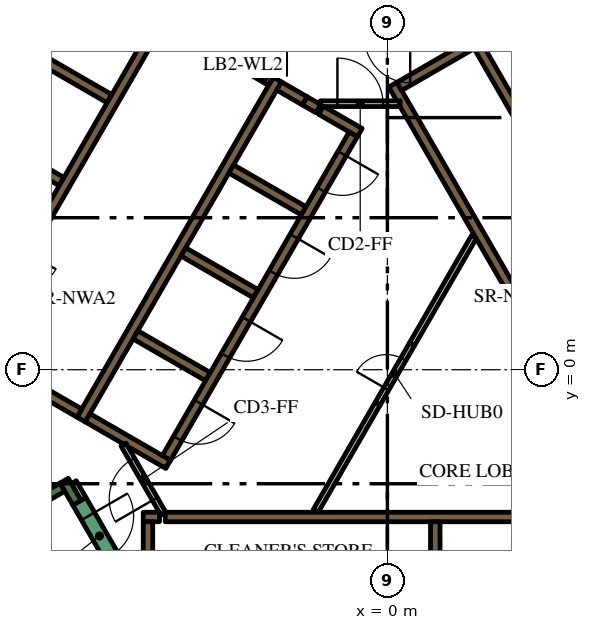
"""IFC4 building model, lengths in metres.
Left out: names, types, materials, properties, quantities, classifications, styles, units other than length and angle.
Written with IfcOpenShell. Run it as: python <this file> out.ifc"""

import sys

from ifc_helpers import new_model, si_unit, direction, frame, frame_2d, origin, place, context, subcontext, project, spatial, polyline, rectangle, outline, extrude, element, fill, save


model = new_model("IFC4")
c1 = context("Model", 3, precision=1e-05, world=origin(), true_north=direction((0.0, 1.0)))
c2 = subcontext(c1, "Body", "Model", "MODEL_VIEW")
j1 = project(units=[si_unit("LENGTHUNIT", "METRE"), si_unit("PLANEANGLEUNIT", "RADIAN")], contexts=[c1])
p1 = place(None, origin())
s1 = spatial("IfcSite", under=j1, at=p1, CompositionType="ELEMENT")
p2 = place(p1, origin())
s2 = spatial("IfcBuilding", under=s1, at=p2, CompositionType="ELEMENT")
p3 = place(p2, frame((0.0, 0.0, 87.6)))
s3 = spatial("IfcBuildingStorey", under=s2, at=p3, CompositionType="ELEMENT", Elevation=87.6)
p4 = place(p3, frame((-15.36, -1.503, 0.0), z_axis=(0.0, 0.0, 1.0), x_axis=(0.50000389221, 0.866023156604, 0.0)))
e1 = element("IfcWall", 1, at=p4, inside=s3, PredefinedType="SOLIDWALL", context=c2, shape_type="SweptSolid", body=[
    extrude(rectangle(XDim=21.0, YDim=0.9, at=frame_2d((10.5, 0.0))), origin(), (0.0, 0.0, 1.0), 3.9),
])
p5 = place(p3, frame((-14.44, -6.49, 0.0), z_axis=(0.0, 0.0, 1.0), x_axis=(0.866022966069, 0.500004222222, 0.0)))
e2 = element("IfcWall", 2, at=p5, inside=s3, PredefinedType="SOLIDWALL", context=c2, shape_type="SweptSolid", body=[
    extrude(rectangle(XDim=6.8, YDim=0.25, at=frame_2d((3.4, 0.0))), origin(), (0.0, 0.0, 1.0), 3.9),
])
p6 = place(p3, frame((-8.168, -3.503, 0.0), z_axis=(0.0, 0.0, 1.0), x_axis=(-0.499952099219, 0.866053057547, 0.0)))
e3 = element("IfcWall", 3, at=p6, inside=s3, PredefinedType="SOLIDWALL", context=c2, shape_type="SweptSolid", body=[
    extrude(rectangle(XDim=0.675, YDim=0.25, at=frame_2d((0.337, 0.0))), origin(), (0.0, 0.0, 1.0), 3.9),
])
p7 = place(p3, frame((-5.845, -3.875, 0.0), z_axis=(0.0, 0.0, 1.0), x_axis=(1.0, 0.0, 0.0)))
e4 = element("IfcWall", 4, at=p7, inside=s3, PredefinedType="SOLIDWALL", context=c2, shape_type="SweptSolid", body=[
    extrude(rectangle(XDim=12.27, YDim=0.25, at=frame_2d((6.135, 0.0))), origin(), (0.0, 0.0, 1.0), 3.9),
])
p8 = place(p3, frame((-6.425, -3.875, 0.0), z_axis=(0.0, 0.0, 1.0), x_axis=(1.0, 0.0, 0.0)))
e5 = element("IfcWall", 5, at=p8, inside=s3, PredefinedType="SOLIDWALL", context=c2, shape_type="SweptSolid", body=[
    extrude(rectangle(XDim=0.428, YDim=0.25, at=frame_2d((0.214, 0.0))), origin(), (0.0, 0.0, 1.0), 3.9),
])
p9 = place(p3, frame((1.26, -4.0, 0.0), z_axis=(0.0, 0.0, 1.0), x_axis=(0.0, -1.0, 0.0)))
e6 = element("IfcWall", 6, at=p9, inside=s3, PredefinedType="SOLIDWALL", context=c2, shape_type="SweptSolid", body=[
    extrude(rectangle(XDim=2.2, YDim=0.25, at=frame_2d((1.1, 0.0))), origin(), (0.0, 0.0, 1.0), 3.9),
])
p10 = place(p3, frame((-6.3, -4.0, 0.0), z_axis=(0.0, 0.0, 1.0), x_axis=(0.0, -1.0, 0.0)))
e7 = element("IfcWall", 7, at=p10, inside=s3, PredefinedType="SOLIDWALL", context=c2, shape_type="SweptSolid", body=[
    extrude(rectangle(XDim=3.154, YDim=0.25, at=frame_2d((1.577, 0.0))), origin(), (0.0, 0.0, 1.0), 3.9),
])
p11 = place(p3, origin())
e8 = element("IfcWall", 8, at=p11, inside=s3, PredefinedType="SOLIDWALL", context=c2, shape_type="SweptSolid", body=[
    extrude(outline(polyline([(0.335, 6.925), (0.335, 7.075), (0.335, 7.075), (0.335, 7.075), (0.245, 7.075), (0.079, 7.363), (0.035, 7.439), (0.252, 7.564), (0.377, 7.348), (6.552, -3.348), (6.677, -3.564), (6.46, -3.689), (4.897, -0.981), (0.332, 6.925), (0.335, 6.925), (0.335, 6.925), (0.335, 6.925)])), origin(), (0.0, 0.0, 1.0), 3.9),
])
p12 = place(p3, frame((0.314, 7.456, 0.0), z_axis=(0.0, 0.0, 1.0), x_axis=(0.866013897511, 0.50001992892, 0.0)))
e9 = element("IfcWall", 9, at=p12, inside=s3, PredefinedType="SOLIDWALL", context=c2, shape_type="SweptSolid", body=[
    extrude(rectangle(XDim=3.268, YDim=0.25, at=frame_2d((1.634, 0.0))), origin(), (0.0, 0.0, 1.0), 3.9),
])
p13 = place(p3, frame((-8.06, -1.311, 0.0), z_axis=(0.0, 0.0, 1.0), x_axis=(0.50000273126, 0.866023826885, 0.0)))
e10 = element("IfcWall", 10, at=p13, inside=s3, PredefinedType="SOLIDWALL", context=c2, shape_type="SweptSolid", body=[
    extrude(rectangle(XDim=10.33, YDim=0.25, at=frame_2d((5.165, 0.0))), origin(), (0.0, 0.0, 1.0), 3.9),
])
p14 = place(p3, frame((-1.819, 6.87, 0.0), z_axis=(0.0, 0.0, 1.0), x_axis=(-0.866294599386, 0.499533449405, 0.0)))
e11 = element("IfcWall", 11, at=p14, inside=s3, PredefinedType="SOLIDWALL", context=c2, shape_type="SweptSolid", body=[
    extrude(rectangle(XDim=0.41, YDim=0.25, at=frame_2d((0.205, 0.0))), origin(), (0.0, 0.0, 1.0), 3.9),
])
p15 = place(p3, frame((-2.849, 7.465, 0.0), z_axis=(0.0, 0.0, 1.0), x_axis=(0.865955664968, -0.500120771724, 0.0)))
e12 = element("IfcWall", 12, at=p15, inside=s3, PredefinedType="SOLIDWALL", context=c2, shape_type="SweptSolid", body=[
    extrude(rectangle(XDim=0.778, YDim=0.25, at=frame_2d((0.389, 0.0))), origin(), (0.0, 0.0, 1.0), 3.9),
])
p16 = place(p3, frame((-0.728, 6.24, 0.0), z_axis=(0.0, 0.0, 1.0), x_axis=(-0.866002680491, 0.500039355833, 0.0)))
e13 = element("IfcWall", 13, at=p16, inside=s3, PredefinedType="SOLIDWALL", context=c2, shape_type="SweptSolid", body=[
    extrude(rectangle(XDim=1.178, YDim=0.25, at=frame_2d((0.589, 0.0))), origin(), (0.0, 0.0, 1.0), 3.9),
])
for number, where, z_axis, x_axis in (
    (14, (-2.204, 4.182, 0.0), (0.0, 0.0, 1.0), (-0.866, 0.5, 0.0)),
    (15, (-5.369, 3.1, 0.0), (0.0, 0.0, 1.0), (0.866, -0.5, 0.0)),
    (16, (-4.724, -0.182, 0.0), (0.0, 0.0, 1.0), (-0.866, 0.5, 0.0)),
):
    element("IfcWall", number, at=place(p3, frame(where, z_axis=z_axis, x_axis=x_axis)), inside=s3, PredefinedType="SOLIDWALL", context=c2, shape_type="SweptSolid", body=[
        extrude(rectangle(XDim=2.2, YDim=0.25, at=frame_2d((1.1, 0.0))), origin(), (0.0, 0.0, 1.0), 3.9),
    ])
e17 = element("IfcWall", 17, at=p11, inside=s3, PredefinedType="SOLIDWALL", context=c2, shape_type="SweptSolid", body=[
    extrude(outline(polyline([(-5.922, -2.257), (-5.922, -2.257), (-5.705, -2.382), (-5.83, -2.598), (-6.829, -2.021), (-6.88, -1.934), (-6.88, -1.934), (-6.93, -1.963), (-7.952, -1.373), (-7.827, -1.156), (-5.922, -2.257)])), origin(), (0.0, 0.0, 1.0), 3.9),
])
p17 = place(p3, frame((-8.106, -1.14, 0.0), z_axis=(0.0, 0.0, 1.0), x_axis=(-0.866000643155, 0.500042884217, 0.0)))
e18 = element("IfcWall", 18, at=p17, inside=s3, PredefinedType="SOLIDWALL", context=c2, shape_type="SweptSolid", body=[
    extrude(rectangle(XDim=5.65, YDim=0.25, at=frame_2d((2.825, 0.0))), origin(), (0.0, 0.0, 1.0), 3.9),
])
e19 = element("IfcWall", 19, at=p11, inside=s3, PredefinedType="SOLIDWALL", context=c2, shape_type="SweptSolid", body=[
    extrude(outline(polyline([(-3.128, 7.481), (-3.259, 7.557), (-3.134, 7.773), (-3.003, 7.698), (-3.128, 7.481)])), origin(), (0.0, 0.0, 1.0), 3.9),
])
for number, where, z_axis, x_axis in (
    (20, (-8.574, 4.95, 0.0), (0.0, 0.0, 1.0), (-0.866, 0.5, 0.0)),
    (21, (-7.314, 7.132, 0.0), (0.0, 0.0, 1.0), (-0.866, 0.5, 0.0)),
):
    element("IfcWall", number, at=place(p3, frame(where, z_axis=z_axis, x_axis=x_axis)), inside=s3, PredefinedType="SOLIDWALL", context=c2, shape_type="SweptSolid", body=[
        extrude(rectangle(XDim=2.2, YDim=0.25, at=frame_2d((1.1, 0.0))), origin(), (0.0, 0.0, 1.0), 3.9),
    ])
p18 = place(p3, frame((-7.959, 10.415, 0.0), z_axis=(0.0, 0.0, 1.0), x_axis=(0.866020958405, -0.500007699544, 0.0)))
e22 = element("IfcWall", 22, at=p18, inside=s3, PredefinedType="SOLIDWALL", context=c2, shape_type="SweptSolid", body=[
    extrude(rectangle(XDim=4.1, YDim=0.25, at=frame_2d((2.05, 0.0))), origin(), (0.0, 0.0, 1.0), 3.9),
])
p19 = place(p3, frame((-8.252, -2.958, 0.0), z_axis=(0.0, 0.0, 1.0), x_axis=(0.500174715838, -0.865924508047, 0.0)))
e23 = element("IfcWall", 23, at=p19, inside=s3, PredefinedType="PARTITIONING", context=c2, shape_type="SweptSolid", body=[
    extrude(rectangle(XDim=0.514, YDim=0.15, at=frame_2d((0.257, 0.0))), origin(), (0.0, 0.0, 1.0), 2.75),
])
for number, where, z_axis, x_axis in (
    (24, (-1.887, -3.718, 0.0), (0.0, 0.0, 1.0), (0.5, 0.866, 0.0)),
    (25, (0.645, 0.667, 0.0), (0.0, 0.0, 1.0), (0.5, 0.866, 0.0)),
):
    element("IfcWall", number, at=place(p3, frame(where, z_axis=z_axis, x_axis=x_axis)), inside=s3, PredefinedType="PARTITIONING", context=c2, shape_type="SweptSolid", body=[
        extrude(rectangle(XDim=3.263, YDim=0.15, at=frame_2d((1.632, 0.0))), origin(), (0.0, 0.0, 1.0), 2.75),
    ])
p20 = place(p3, frame((8.565, -2.185, 0.0), z_axis=(0.0, 0.0, 1.0), x_axis=(-0.499997954832, 0.866026584559, 0.0)))
e26 = element("IfcWall", 26, at=p20, inside=s3, PredefinedType="SOLIDWALL", context=c2, shape_type="SweptSolid", body=[
    extrude(rectangle(XDim=12.35, YDim=0.25, at=frame_2d((6.175, 0.0))), origin(), (0.0, 0.0, 1.0), 3.9),
])
p21 = place(p20, frame((5.725, 0.0, 0.0)))
e27 = element("IfcOpeningElement", 27, at=p21, cuts=e26, PredefinedType="OPENING", context=c2, shape_type="SweptSolid", body=[
    extrude(rectangle(XDim=0.9, YDim=2.1, at=frame_2d((0.45, 1.05))), frame((0.0, 0.135, 0.0), z_axis=(0.0, -1.0, 0.0), x_axis=(1.0, 0.0, 0.0)), (0.0, 0.0, 1.0), 0.27),
])
p22 = place(p3, frame((-6.008, 9.144, 0.0), z_axis=(0.0, 0.0, 1.0), x_axis=(-0.500006956611, -0.866021387346, 0.0)))
e28 = element("IfcWall", 28, at=p22, inside=s3, PredefinedType="SOLIDWALL", context=c2, shape_type="SweptSolid", body=[
    extrude(rectangle(XDim=9.83, YDim=0.25, at=frame_2d((4.915, 0.0))), origin(), (0.0, 0.0, 1.0), 3.9),
])
p23 = place(p22, frame((6.985, 0.0, 0.0)))
e29 = element("IfcOpeningElement", 29, at=p23, cuts=e28, PredefinedType="OPENING", context=c2, shape_type="SweptSolid", body=[
    extrude(rectangle(XDim=0.9, YDim=2.1, at=frame_2d((0.45, 1.05))), frame((0.0, 0.135, 0.0), z_axis=(0.0, -1.0, 0.0), x_axis=(1.0, 0.0, 0.0)), (0.0, 0.0, 1.0), 0.27),
])
p24 = place(p3, frame((-0.898, 6.194, 0.0), z_axis=(0.0, 0.0, 1.0), x_axis=(-0.499996202215, -0.866027596426, 0.0)))
e30 = element("IfcWall", 30, at=p24, inside=s3, PredefinedType="SOLIDWALL", context=c2, shape_type="SweptSolid", body=[
    extrude(rectangle(XDim=9.83, YDim=0.25, at=frame_2d((4.915, 0.0))), origin(), (0.0, 0.0, 1.0), 3.9),
])
p25 = place(p24, frame((0.585, 0.0, 0.0)))
e31 = element("IfcOpeningElement", 31, at=p25, cuts=e30, PredefinedType="OPENING", context=c2, shape_type="SweptSolid", body=[
    extrude(rectangle(XDim=1.1, YDim=2.1, at=frame_2d((0.55, 1.05))), frame((0.0, 0.135, 0.0), z_axis=(0.0, -1.0, 0.0), x_axis=(1.0, 0.0, 0.0)), (0.0, 0.0, 1.0), 0.27),
])
p26 = place(p24, frame((3.105, 0.0, 0.0)))
e32 = element("IfcOpeningElement", 32, at=p26, cuts=e30, PredefinedType="OPENING", context=c2, shape_type="SweptSolid", body=[
    extrude(rectangle(XDim=1.1, YDim=2.1, at=frame_2d((0.55, 1.05))), frame((0.0, 0.135, 0.0), z_axis=(0.0, -1.0, 0.0), x_axis=(1.0, 0.0, 0.0)), (0.0, 0.0, 1.0), 0.27),
])
p27 = place(p24, frame((5.625, 0.0, 0.0)))
e33 = element("IfcOpeningElement", 33, at=p27, cuts=e30, PredefinedType="OPENING", context=c2, shape_type="SweptSolid", body=[
    extrude(rectangle(XDim=1.1, YDim=2.1, at=frame_2d((0.55, 1.05))), frame((0.0, 0.135, 0.0), z_axis=(0.0, -1.0, 0.0), x_axis=(1.0, 0.0, 0.0)), (0.0, 0.0, 1.0), 0.27),
])
p28 = place(p24, frame((8.145, 0.0, 0.0)))
e34 = element("IfcOpeningElement", 34, at=p28, cuts=e30, PredefinedType="OPENING", context=c2, shape_type="SweptSolid", body=[
    extrude(rectangle(XDim=1.1, YDim=2.1, at=frame_2d((0.55, 1.05))), frame((0.0, 0.135, 0.0), z_axis=(0.0, -1.0, 0.0), x_axis=(1.0, 0.0, 0.0)), (0.0, 0.0, 1.0), 0.27),
])
p29 = place(p3, frame((-8.103, -3.466, 0.0), z_axis=(0.0, 0.0, 1.0), x_axis=(0.500078061341, -0.865980330357, 0.0)))
e35 = element("IfcWall", 35, at=p29, inside=s3, PredefinedType="SOLIDWALL", context=c2, shape_type="SweptSolid", body=[
    extrude(rectangle(XDim=2.1, YDim=0.4, at=frame_2d((1.05, 0.0))), origin(), (0.0, 0.0, 1.0), 3.9),
])
p30 = place(p29, frame((0.45, 0.0, 0.0)))
e36 = element("IfcOpeningElement", 36, at=p30, cuts=e35, PredefinedType="OPENING", context=c2, shape_type="SweptSolid", body=[
    extrude(rectangle(XDim=1.2, YDim=2.1, at=frame_2d((0.6, 1.05))), frame((0.0, 0.21, 0.0), z_axis=(0.0, -1.0, 0.0), x_axis=(1.0, 0.0, 0.0)), (0.0, 0.0, 1.0), 0.42),
])
p31 = place(p3, frame((-1.765, 7.0, 0.0), z_axis=(0.0, 0.0, 1.0), x_axis=(1.0, 0.0, 0.0)))
e37 = element("IfcWall", 37, at=p31, inside=s3, PredefinedType="PARTITIONING", context=c2, shape_type="SweptSolid", body=[
    extrude(rectangle(XDim=2.1, YDim=0.15, at=frame_2d((1.05, 0.0))), origin(), (0.0, 0.0, 1.0), 2.75),
])
p32 = place(p31, frame((0.45, 0.0, 0.0)))
e38 = element("IfcOpeningElement", 38, at=p32, cuts=e37, PredefinedType="OPENING", context=c2, shape_type="SweptSolid", body=[
    extrude(rectangle(XDim=1.2, YDim=2.1, at=frame_2d((0.6, 1.05))), frame((0.0, 0.085, 0.0), z_axis=(0.0, -1.0, 0.0), x_axis=(1.0, 0.0, 0.0)), (0.0, 0.0, 1.0), 0.17),
])
p33 = place(p3, frame((-5.895, -3.79, 0.0), z_axis=(0.0, 0.0, 1.0), x_axis=(-0.49994051562, 0.866059744384, 0.0)))
e39 = element("IfcWall", 39, at=p33, inside=s3, PredefinedType="PARTITIONING", context=c2, shape_type="SweptSolid", body=[
    extrude(rectangle(XDim=2.1, YDim=0.15, at=frame_2d((1.05, 0.0))), origin(), (0.0, 0.0, 1.0), 2.75),
])
p34 = place(p33, frame((0.45, 0.0, 0.0)))
e40 = element("IfcOpeningElement", 40, at=p34, cuts=e39, PredefinedType="OPENING", context=c2, shape_type="SweptSolid", body=[
    extrude(rectangle(XDim=1.2, YDim=2.1, at=frame_2d((0.6, 1.05))), frame((0.0, 0.085, 0.0), z_axis=(0.0, -1.0, 0.0), x_axis=(1.0, 0.0, 0.0)), (0.0, 0.0, 1.0), 0.17),
])
p35 = place(p3, frame((-4.409, 8.365, 0.0), z_axis=(0.0, 0.0, 1.0), x_axis=(0.866034573852, -0.49998411664, 0.0)))
e41 = element("IfcWall", 41, at=p35, inside=s3, PredefinedType="SOLIDWALL", context=c2, shape_type="SweptSolid", body=[
    extrude(rectangle(XDim=1.4, YDim=0.25, at=frame_2d((0.7, 0.0))), origin(), (0.0, 0.0, 1.0), 3.9),
])
p36 = place(p35, frame((0.1, 0.0, 0.0)))
e42 = element("IfcOpeningElement", 42, at=p36, cuts=e41, PredefinedType="OPENING", context=c2, shape_type="SweptSolid", body=[
    extrude(rectangle(XDim=1.2, YDim=2.1, at=frame_2d((0.6, 1.05))), frame((0.0, 0.135, 0.0), z_axis=(0.0, -1.0, 0.0), x_axis=(1.0, 0.0, 0.0)), (0.0, 0.0, 1.0), 0.27),
])
p37 = place(p3, frame((-0.255, -0.892, 0.0), z_axis=(0.0, 0.0, 1.0), x_axis=(0.500062916607, 0.865989075817, 0.0)))
e43 = element("IfcWall", 43, at=p37, inside=s3, PredefinedType="PARTITIONING", context=c2, shape_type="SweptSolid", body=[
    extrude(rectangle(XDim=1.8, YDim=0.15, at=frame_2d((0.9, 0.0))), origin(), (0.0, 0.0, 1.0), 2.75),
])
p38 = place(p37, frame((0.45, 0.0, 0.0)))
e44 = element("IfcOpeningElement", 44, at=p38, cuts=e43, PredefinedType="OPENING", context=c2, shape_type="SweptSolid", body=[
    extrude(rectangle(XDim=0.9, YDim=2.1, at=frame_2d((0.45, 1.05))), frame((0.0, 0.085, 0.0), z_axis=(0.0, -1.0, 0.0), x_axis=(1.0, 0.0, 0.0)), (0.0, 0.0, 1.0), 0.17),
])
p39 = place(p3, frame((-19.081, -3.9, 0.0), z_axis=(0.0, 0.0, 1.0), x_axis=(0.499998313975, 0.866026377209, 0.0)))
e45 = element("IfcWall", 45, at=p39, inside=s3, PredefinedType="PARTITIONING", context=c2, shape_type="SweptSolid", body=[
    extrude(rectangle(XDim=25.766, YDim=0.15, at=frame_2d((12.883, 0.0))), origin(), (0.0, 0.0, 1.0), 2.75),
])
p40 = place(p39, frame((19.306, 0.0, 0.0)))
e46 = element("IfcOpeningElement", 46, at=p40, cuts=e45, PredefinedType="OPENING", context=c2, shape_type="SweptSolid", body=[
    extrude(rectangle(XDim=1.0, YDim=2.1, at=frame_2d((0.5, 1.05))), frame((0.0, 0.085, 0.0), z_axis=(0.0, -1.0, 0.0), x_axis=(1.0, 0.0, 0.0)), (0.0, 0.0, 1.0), 0.17),
])
p41 = place(p39, frame((18.0, 0.0, 0.0)))
e47 = element("IfcOpeningElement", 47, at=p41, cuts=e45, PredefinedType="OPENING", context=c2, shape_type="SweptSolid", body=[
    extrude(rectangle(XDim=1.0, YDim=2.1, at=frame_2d((0.5, 1.05))), frame((0.0, 0.085, 0.0), z_axis=(0.0, -1.0, 0.0), x_axis=(1.0, 0.0, 0.0)), (0.0, 0.0, 1.0), 0.17),
])
p42 = place(p39, frame((10.874, 0.0, 0.0)))
e48 = element("IfcOpeningElement", 48, at=p42, cuts=e45, PredefinedType="OPENING", context=c2, shape_type="SweptSolid", body=[
    extrude(rectangle(XDim=0.9, YDim=2.1, at=frame_2d((0.45, 1.05))), frame((0.0, 0.085, 0.0), z_axis=(0.0, -1.0, 0.0), x_axis=(1.0, 0.0, 0.0)), (0.0, 0.0, 1.0), 0.17),
])
p43 = place(p39, frame((8.548, 0.0, 0.0)))
e49 = element("IfcOpeningElement", 49, at=p43, cuts=e45, PredefinedType="OPENING", context=c2, shape_type="SweptSolid", body=[
    extrude(rectangle(XDim=1.1, YDim=2.1, at=frame_2d((0.55, 1.05))), frame((0.0, 0.085, 0.0), z_axis=(0.0, -1.0, 0.0), x_axis=(1.0, 0.0, 0.0)), (0.0, 0.0, 1.0), 0.17),
])
p44 = place(p39, frame((0.18, 0.0, 0.0)))
e50 = element("IfcOpeningElement", 50, at=p44, cuts=e45, PredefinedType="OPENING", context=c2, shape_type="SweptSolid", body=[
    extrude(rectangle(XDim=1.0, YDim=2.1, at=frame_2d((0.5, 1.05))), frame((0.0, 0.085, 0.0), z_axis=(0.0, -1.0, 0.0), x_axis=(1.0, 0.0, 0.0)), (0.0, 0.0, 1.0), 0.17),
])
p45 = place(p25, origin())
e51 = element("IfcDoor", 51, at=p45, inside=s3, OperationType="DOUBLE_DOOR_SLIDING", PredefinedType="DOOR", context=c2, shape_type="SweptSolid", body=[
    extrude(rectangle(XDim=1.1, YDim=2.1, at=frame_2d((0.55, 1.05))), frame((0.0, 0.025, 0.0), z_axis=(0.0, -1.0, 0.0), x_axis=(1.0, 0.0, 0.0)), (0.0, 0.0, 1.0), 0.05),
])
fill(e31, e51)
p46 = place(p26, origin())
e52 = element("IfcDoor", 52, at=p46, inside=s3, OperationType="DOUBLE_DOOR_SLIDING", PredefinedType="DOOR", context=c2, shape_type="SweptSolid", body=[
    extrude(rectangle(XDim=1.1, YDim=2.1, at=frame_2d((0.55, 1.05))), frame((0.0, 0.025, 0.0), z_axis=(0.0, -1.0, 0.0), x_axis=(1.0, 0.0, 0.0)), (0.0, 0.0, 1.0), 0.05),
])
fill(e32, e52)
p47 = place(p27, origin())
e53 = element("IfcDoor", 53, at=p47, inside=s3, OperationType="DOUBLE_DOOR_SLIDING", PredefinedType="DOOR", context=c2, shape_type="SweptSolid", body=[
    extrude(rectangle(XDim=1.1, YDim=2.1, at=frame_2d((0.55, 1.05))), frame((0.0, 0.025, 0.0), z_axis=(0.0, -1.0, 0.0), x_axis=(1.0, 0.0, 0.0)), (0.0, 0.0, 1.0), 0.05),
])
fill(e33, e53)
p48 = place(p28, origin())
e54 = element("IfcDoor", 54, at=p48, inside=s3, OperationType="DOUBLE_DOOR_SLIDING", PredefinedType="DOOR", context=c2, shape_type="SweptSolid", body=[
    extrude(rectangle(XDim=1.1, YDim=2.1, at=frame_2d((0.55, 1.05))), frame((0.0, 0.025, 0.0), z_axis=(0.0, -1.0, 0.0), x_axis=(1.0, 0.0, 0.0)), (0.0, 0.0, 1.0), 0.05),
])
fill(e34, e54)
p49 = place(p30, origin())
e55 = element("IfcDoor", 55, at=p49, inside=s3, OperationType="SINGLE_SWING_LEFT", PredefinedType="DOOR", context=c2, shape_type="SweptSolid", body=[
    extrude(rectangle(XDim=1.2, YDim=2.1, at=frame_2d((0.6, 1.05))), frame((0.0, 0.025, 0.0), z_axis=(0.0, -1.0, 0.0), x_axis=(1.0, 0.0, 0.0)), (0.0, 0.0, 1.0), 0.05),
])
fill(e36, e55)
p50 = place(p32, origin())
e56 = element("IfcDoor", 56, at=p50, inside=s3, OperationType="SINGLE_SWING_LEFT", PredefinedType="DOOR", context=c2, shape_type="SweptSolid", body=[
    extrude(rectangle(XDim=1.2, YDim=2.1, at=frame_2d((0.6, 1.05))), frame((0.0, 0.025, 0.0), z_axis=(0.0, -1.0, 0.0), x_axis=(1.0, 0.0, 0.0)), (0.0, 0.0, 1.0), 0.05),
])
fill(e38, e56)
p51 = place(p34, origin())
e57 = element("IfcDoor", 57, at=p51, inside=s3, OperationType="SINGLE_SWING_LEFT", PredefinedType="DOOR", context=c2, shape_type="SweptSolid", body=[
    extrude(rectangle(XDim=1.2, YDim=2.1, at=frame_2d((0.6, 1.05))), frame((0.0, 0.025, 0.0), z_axis=(0.0, -1.0, 0.0), x_axis=(1.0, 0.0, 0.0)), (0.0, 0.0, 1.0), 0.05),
])
fill(e40, e57)
p52 = place(p36, origin())
e58 = element("IfcDoor", 58, at=p52, inside=s3, OperationType="SINGLE_SWING_LEFT", PredefinedType="DOOR", context=c2, shape_type="SweptSolid", body=[
    extrude(rectangle(XDim=1.2, YDim=2.1, at=frame_2d((0.6, 1.05))), frame((0.0, 0.025, 0.0), z_axis=(0.0, -1.0, 0.0), x_axis=(1.0, 0.0, 0.0)), (0.0, 0.0, 1.0), 0.05),
])
fill(e42, e58)
p53 = place(p38, origin())
e59 = element("IfcDoor", 59, at=p53, inside=s3, OperationType="SINGLE_SWING_LEFT", PredefinedType="DOOR", context=c2, shape_type="SweptSolid", body=[
    extrude(rectangle(XDim=0.9, YDim=2.1, at=frame_2d((0.45, 1.05))), frame((0.0, 0.025, 0.0), z_axis=(0.0, -1.0, 0.0), x_axis=(1.0, 0.0, 0.0)), (0.0, 0.0, 1.0), 0.05),
])
fill(e44, e59)
save(model, sys.argv[1])
